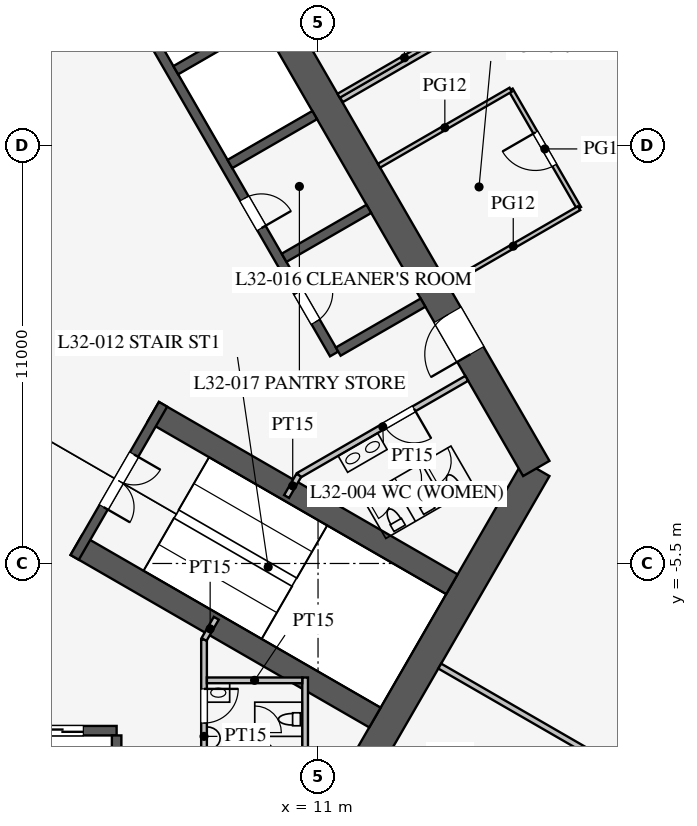
"""IFC4 building model, lengths in metres.
Left out: names, types, materials, properties, quantities, classifications, styles, units other than length and angle.
Written with IfcOpenShell. Run it as: python <this file> out.ifc"""

import sys

from ifc_helpers import new_model, si_unit, direction, frame, frame_2d, origin, place, context, subcontext, project, spatial, rectangle, extrude, element, fill, save


model = new_model("IFC4")
c1 = context("Model", 3, precision=1e-05, world=origin(), true_north=direction((0.0, 1.0)))
c2 = subcontext(c1, "Body", "Model", "MODEL_VIEW")
j1 = project(units=[si_unit("LENGTHUNIT", "METRE"), si_unit("PLANEANGLEUNIT", "RADIAN")], contexts=[c1])
p1 = place(None, origin())
s1 = spatial("IfcSite", under=j1, at=p1, CompositionType="ELEMENT")
p2 = place(p1, origin())
s2 = spatial("IfcBuilding", under=s1, at=p2, CompositionType="ELEMENT")
p3 = place(p2, frame((0.0, 0.0, 140.9)))
s3 = spatial("IfcBuildingStorey", under=s2, at=p3, CompositionType="ELEMENT", Elevation=140.9)
p4 = place(p3, frame((10.97, -13.0, 0.0), z_axis=(0.0, 0.0, 1.0), x_axis=(0.499995765644, 0.866027848477, 0.0)))
e1 = element("IfcWall", 1, at=p4, inside=s3, PredefinedType="SHEAR", context=c2, shape_type="SweptSolid", body=[
    extrude(rectangle(XDim=11.547, YDim=0.8, at=frame_2d((5.773, 0.0))), origin(), (0.0, 0.0, 1.0), 4.2),
])
p5 = place(p3, frame((16.743, -3.0, 0.0), z_axis=(0.0, 0.0, 1.0), x_axis=(-0.500002442456, 0.866023993627, 0.0)))
e2 = element("IfcWall", 2, at=p5, inside=s3, PredefinedType="SHEAR", context=c2, shape_type="SweptSolid", body=[
    extrude(rectangle(XDim=21.939, YDim=0.8, at=frame_2d((10.97, 0.0))), origin(), (0.0, 0.0, 1.0), 4.2),
])
p6 = place(p5, frame((17.27, 0.0, 0.0)))
e3 = element("IfcOpeningElement", 3, at=p6, cuts=e2, PredefinedType="OPENING", context=c2, shape_type="SweptSolid", body=[
    extrude(rectangle(XDim=1.2, YDim=2.1, at=frame_2d((0.6, 1.05))), frame((0.0, 0.41, 0.0), z_axis=(0.0, -1.0, 0.0), x_axis=(1.0, 0.0, 0.0)), (0.0, 0.0, 1.0), 0.82),
])
p7 = place(p5, frame((3.47, 0.0, 0.0)))
e4 = element("IfcOpeningElement", 4, at=p7, cuts=e2, PredefinedType="OPENING", context=c2, shape_type="SweptSolid", body=[
    extrude(rectangle(XDim=1.2, YDim=2.1, at=frame_2d((0.6, 1.05))), frame((0.0, 0.41, 0.0), z_axis=(0.0, -1.0, 0.0), x_axis=(1.0, 0.0, 0.0)), (0.0, 0.0, 1.0), 0.82),
])
p8 = place(p3, frame((-5.7, -9.9, 0.0), z_axis=(0.0, 0.0, 1.0), x_axis=(1.0, 0.0, 0.0)))
e5 = element("IfcWall", 5, at=p8, inside=s3, PredefinedType="SHEAR", context=c2, shape_type="SweptSolid", body=[
    extrude(rectangle(XDim=11.4, YDim=0.25, at=frame_2d((5.7, 0.0))), origin(), (0.0, 0.0, 1.0), 4.2),
])
p9 = place(p8, frame((0.875, 0.0, 0.0)))
e6 = element("IfcOpeningElement", 6, at=p9, cuts=e5, PredefinedType="OPENING", context=c2, shape_type="SweptSolid", body=[
    extrude(rectangle(XDim=1.1, YDim=2.2, at=frame_2d((0.55, 1.1))), frame((0.0, 0.135, 0.0), z_axis=(0.0, -1.0, 0.0), x_axis=(1.0, 0.0, 0.0)), (0.0, 0.0, 1.0), 0.27),
])
p10 = place(p8, frame((3.725, 0.0, 0.0)))
e7 = element("IfcOpeningElement", 7, at=p10, cuts=e5, PredefinedType="OPENING", context=c2, shape_type="SweptSolid", body=[
    extrude(rectangle(XDim=1.1, YDim=2.2, at=frame_2d((0.55, 1.1))), frame((0.0, 0.135, 0.0), z_axis=(0.0, -1.0, 0.0), x_axis=(1.0, 0.0, 0.0)), (0.0, 0.0, 1.0), 0.27),
])
p11 = place(p8, frame((6.575, 0.0, 0.0)))
e8 = element("IfcOpeningElement", 8, at=p11, cuts=e5, PredefinedType="OPENING", context=c2, shape_type="SweptSolid", body=[
    extrude(rectangle(XDim=1.1, YDim=2.2, at=frame_2d((0.55, 1.1))), frame((0.0, 0.135, 0.0), z_axis=(0.0, -1.0, 0.0), x_axis=(1.0, 0.0, 0.0)), (0.0, 0.0, 1.0), 0.27),
])
p12 = place(p8, frame((9.425, 0.0, 0.0)))
e9 = element("IfcOpeningElement", 9, at=p12, cuts=e5, PredefinedType="OPENING", context=c2, shape_type="SweptSolid", body=[
    extrude(rectangle(XDim=1.1, YDim=2.2, at=frame_2d((0.55, 1.1))), frame((0.0, 0.135, 0.0), z_axis=(0.0, -1.0, 0.0), x_axis=(1.0, 0.0, 0.0)), (0.0, 0.0, 1.0), 0.27),
])
p13 = place(p3, frame((5.7, -10.025, 0.0), z_axis=(0.0, 0.0, 1.0), x_axis=(0.0, -1.0, 0.0)))
e10 = element("IfcWall", 10, at=p13, inside=s3, PredefinedType="SHEAR", context=c2, shape_type="SweptSolid", body=[
    extrude(rectangle(XDim=2.575, YDim=0.25, at=frame_2d((1.288, 0.0))), origin(), (0.0, 0.0, 1.0), 4.2),
])
p14 = place(p3, frame((11.424, 0.014, 0.0), z_axis=(0.0, 0.0, 1.0), x_axis=(-0.500001763848, 0.866024385424, 0.0)))
e11 = element("IfcWall", 11, at=p14, inside=s3, PredefinedType="SHEAR", context=c2, shape_type="SweptSolid", body=[
    extrude(rectangle(XDim=11.4, YDim=0.25, at=frame_2d((5.7, 0.0))), origin(), (0.0, 0.0, 1.0), 4.2),
])
p15 = place(p14, frame((0.975, 0.0, 0.0)))
e12 = element("IfcOpeningElement", 12, at=p15, cuts=e11, PredefinedType="OPENING", context=c2, shape_type="SweptSolid", body=[
    extrude(rectangle(XDim=0.9, YDim=2.1, at=frame_2d((0.45, 1.05))), frame((0.0, 0.135, 0.0), z_axis=(0.0, -1.0, 0.0), x_axis=(1.0, 0.0, 0.0)), (0.0, 0.0, 1.0), 0.27),
])
p16 = place(p14, frame((3.825, 0.0, 0.0)))
e13 = element("IfcOpeningElement", 13, at=p16, cuts=e11, PredefinedType="OPENING", context=c2, shape_type="SweptSolid", body=[
    extrude(rectangle(XDim=0.9, YDim=2.1, at=frame_2d((0.45, 1.05))), frame((0.0, 0.135, 0.0), z_axis=(0.0, -1.0, 0.0), x_axis=(1.0, 0.0, 0.0)), (0.0, 0.0, 1.0), 0.27),
])
for number, where, z_axis, x_axis in (
    (14, (11.532, 0.076, 0.0), (0.0, 0.0, 1.0), (0.866, 0.5, 0.0)),
    (15, (10.107, 2.544, 0.0), (0.0, 0.0, 1.0), (0.866, 0.5, 0.0)),
    (16, (8.682, 5.012, 0.0), (0.0, 0.0, 1.0), (0.866, 0.5, 0.0)),
    (17, (7.257, 7.481, 0.0), (0.0, 0.0, 1.0), (0.866, 0.5, 0.0)),
):
    element("IfcWall", number, at=place(p3, frame(where, z_axis=z_axis, x_axis=x_axis)), inside=s3, PredefinedType="SHEAR", context=c2, shape_type="SweptSolid", body=[
        extrude(rectangle(XDim=2.575, YDim=0.25, at=frame_2d((1.288, 0.0))), origin(), (0.0, 0.0, 1.0), 4.2),
    ])
for number, where, z_axis, x_axis in (
    (18, (4.638, -5.016, 0.0), (0.0, 0.0, 1.0), (0.866, -0.5, 0.0)),
    (19, (6.663, -1.509, 0.0), (0.0, 0.0, 1.0), (0.866, -0.5, 0.0)),
):
    element("IfcWall", number, at=place(p3, frame(where, z_axis=z_axis, x_axis=x_axis)), inside=s3, PredefinedType="SHEAR", context=c2, shape_type="SweptSolid", body=[
        extrude(rectangle(XDim=9.075, YDim=0.6, at=frame_2d((4.538, 0.0))), origin(), (0.0, 0.0, 1.0), 4.2),
    ])
p17 = place(p3, frame((4.597, -5.339, 0.0), z_axis=(0.0, 0.0, 1.0), x_axis=(0.499984536904, 0.866034331223, 0.0)))
e20 = element("IfcWall", 20, at=p17, inside=s3, PredefinedType="SHEAR", context=c2, shape_type="SweptSolid", body=[
    extrude(rectangle(XDim=4.65, YDim=0.25, at=frame_2d((2.325, 0.0))), origin(), (0.0, 0.0, 1.0), 4.2),
])
p18 = place(p17, frame((1.525, 0.0, 0.0)))
e21 = element("IfcOpeningElement", 21, at=p18, cuts=e20, PredefinedType="OPENING", context=c2, shape_type="SweptSolid", body=[
    extrude(rectangle(XDim=1.6, YDim=2.1, at=frame_2d((0.8, 1.05))), frame((0.0, 0.135, 0.0), z_axis=(0.0, -1.0, 0.0), x_axis=(1.0, 0.0, 0.0)), (0.0, 0.0, 1.0), 0.27),
])
p19 = place(p3, frame((8.0, -7.5, 0.0), z_axis=(0.0, 0.0, 1.0), x_axis=(0.0, -1.0, 0.0)))
e22 = element("IfcWall", 22, at=p19, inside=s3, PredefinedType="PARTITIONING", context=c2, shape_type="SweptSolid", body=[
    extrude(rectangle(XDim=5.1, YDim=0.15, at=frame_2d((2.55, 0.0))), origin(), (0.0, 0.0, 1.0), 4.0),
])
p20 = place(p19, frame((1.3, 0.0, 0.0)))
e23 = element("IfcOpeningElement", 23, at=p20, cuts=e22, PredefinedType="OPENING", context=c2, shape_type="SweptSolid", body=[
    extrude(rectangle(XDim=0.9, YDim=2.1, at=frame_2d((0.45, 1.05))), frame((0.0, 0.085, 0.0), z_axis=(0.0, -1.0, 0.0), x_axis=(1.0, 0.0, 0.0)), (0.0, 0.0, 1.0), 0.17),
])
p21 = place(p3, frame((10.495, -3.178, 0.0), z_axis=(0.0, 0.0, 1.0), x_axis=(0.86602216432, 0.500005610874, 0.0)))
e24 = element("IfcWall", 24, at=p21, inside=s3, PredefinedType="PARTITIONING", context=c2, shape_type="SweptSolid", body=[
    extrude(rectangle(XDim=5.1, YDim=0.15, at=frame_2d((2.55, 0.0))), origin(), (0.0, 0.0, 1.0), 4.0),
])
p22 = place(p21, frame((2.6, 0.0, 0.0)))
e25 = element("IfcOpeningElement", 25, at=p22, cuts=e24, PredefinedType="OPENING", context=c2, shape_type="SweptSolid", body=[
    extrude(rectangle(XDim=0.9, YDim=2.1, at=frame_2d((0.45, 1.05))), frame((0.0, 0.085, 0.0), z_axis=(0.0, -1.0, 0.0), x_axis=(1.0, 0.0, 0.0)), (0.0, 0.0, 1.0), 0.17),
])
for number, where, z_axis, x_axis in (
    (26, (8.0, -7.5, 0.0), (0.0, 0.0, 1.0), (0.5, 0.866, 0.0)),
    (27, (10.495, -3.178, 0.0), (0.0, 0.0, 1.0), (-0.5, -0.866, 0.0)),
):
    element("IfcWall", number, at=place(p3, frame(where, z_axis=z_axis, x_axis=x_axis)), inside=s3, PredefinedType="PARTITIONING", context=c2, shape_type="SweptSolid", body=[
        extrude(rectangle(XDim=0.645, YDim=0.15, at=frame_2d((0.323, 0.0))), origin(), (0.0, 0.0, 1.0), 4.0),
    ])
p23 = place(p3, frame((10.66, -8.5, 0.0), z_axis=(0.0, 0.0, 1.0), x_axis=(0.0, -1.0, 0.0)))
e28 = element("IfcWall", 28, at=p23, inside=s3, PredefinedType="PARTITIONING", context=c2, shape_type="SweptSolid", body=[
    extrude(rectangle(XDim=4.1, YDim=0.15, at=frame_2d((2.05, 0.0))), origin(), (0.0, 0.0, 1.0), 4.0),
])
p24 = place(p3, frame((8.075, -8.575, 0.0), z_axis=(0.0, 0.0, 1.0), x_axis=(1.0, 0.0, 0.0)))
e29 = element("IfcWall", 29, at=p24, inside=s3, PredefinedType="PARTITIONING", context=c2, shape_type="SweptSolid", body=[
    extrude(rectangle(XDim=2.51, YDim=0.15, at=frame_2d((1.255, 0.0))), origin(), (0.0, 0.0, 1.0), 4.0),
])
p25 = place(p3, frame((14.203, -8.2, 0.0), z_axis=(0.0, 0.0, 1.0), x_axis=(0.866024668836, -0.500001272966, 0.0)))
e30 = element("IfcWall", 30, at=p25, inside=s3, PredefinedType="PARTITIONING", context=c2, shape_type="SweptSolid", body=[
    extrude(rectangle(XDim=16.65, YDim=0.15, at=frame_2d((8.325, 0.0))), origin(), (0.0, 0.0, 1.0), 2.3),
])
p26 = place(p3, frame((11.613, 6.705, 0.0), z_axis=(0.0, 0.0, 1.0), x_axis=(0.866031170684, 0.499990011303, 0.0)))
e31 = element("IfcWall", 31, at=p26, inside=s3, PredefinedType="PARTITIONING", context=c2, shape_type="SweptSolid", body=[
    extrude(rectangle(XDim=11.585, YDim=0.15, at=frame_2d((5.792, 0.0))), origin(), (0.0, 0.0, 1.0), 3.2),
])
p27 = place(p3, frame((17.869, 3.85, 0.0), z_axis=(0.0, 0.0, 1.0), x_axis=(-0.500012057535, 0.866018442252, 0.0)))
e32 = element("IfcWall", 32, at=p27, inside=s3, PredefinedType="PARTITIONING", context=c2, shape_type="SweptSolid", body=[
    extrude(rectangle(XDim=3.6, YDim=0.12, at=frame_2d((1.8, 0.0))), origin(), (0.0, 0.0, 1.0), 2.9),
])
p28 = place(p27, frame((1.3, 0.0, 0.15)))
e33 = element("IfcOpeningElement", 33, at=p28, cuts=e32, PredefinedType="OPENING", context=c2, shape_type="SweptSolid", body=[
    extrude(rectangle(XDim=1.0, YDim=2.1, at=frame_2d((0.5, 1.05))), frame((0.0, 0.07, 0.0), z_axis=(0.0, -1.0, 0.0), x_axis=(1.0, 0.0, 0.0)), (0.0, 0.0, 1.0), 0.14),
])
for number, where, z_axis, x_axis in (
    (34, (11.542, 6.808, 0.0), (0.0, 0.0, 1.0), (0.866, 0.5, 0.0)),
    (35, (12.605, 4.968, 0.0), (0.0, 0.0, 1.0), (0.866, 0.5, 0.0)),
    (36, (14.405, 1.85, 0.0), (0.0, 0.0, 1.0), (0.866, 0.5, 0.0)),
):
    element("IfcWall", number, at=place(p3, frame(where, z_axis=z_axis, x_axis=x_axis)), inside=s3, PredefinedType="PARTITIONING", context=c2, shape_type="SweptSolid", body=[
        extrude(rectangle(XDim=4.0, YDim=0.12, at=frame_2d((2.0, 0.0))), origin(), (0.0, 0.0, 1.0), 2.9),
    ])
p29 = place(p20, origin())
e37 = element("IfcDoor", 37, at=p29, inside=s3, OperationType="SINGLE_SWING_LEFT", PredefinedType="DOOR", context=c2, shape_type="SweptSolid", body=[
    extrude(rectangle(XDim=0.9, YDim=2.1, at=frame_2d((0.45, 1.05))), frame((0.0, 0.025, 0.0), z_axis=(0.0, -1.0, 0.0), x_axis=(1.0, 0.0, 0.0)), (0.0, 0.0, 1.0), 0.05),
])
fill(e23, e37)
p30 = place(p22, frame((0.9, 0.0, 0.0), z_axis=(0.0, 0.0, 1.0), x_axis=(-1.0, 0.0, 0.0)))
e38 = element("IfcDoor", 38, at=p30, inside=s3, OperationType="SINGLE_SWING_LEFT", PredefinedType="DOOR", context=c2, shape_type="SweptSolid", body=[
    extrude(rectangle(XDim=0.9, YDim=2.1, at=frame_2d((0.45, 1.05))), frame((0.0, 0.025, 0.0), z_axis=(0.0, -1.0, 0.0), x_axis=(1.0, 0.0, 0.0)), (0.0, 0.0, 1.0), 0.05),
])
fill(e25, e38)
p31 = place(p18, frame((1.6, 0.0, 0.0), z_axis=(0.0, 0.0, 1.0), x_axis=(-1.0, 0.0, 0.0)))
e39 = element("IfcDoor", 39, at=p31, inside=s3, OperationType="DOUBLE_DOOR_SINGLE_SWING", PredefinedType="DOOR", context=c2, shape_type="SweptSolid", body=[
    extrude(rectangle(XDim=1.6, YDim=2.1, at=frame_2d((0.8, 1.05))), frame((0.0, 0.025, 0.0), z_axis=(0.0, -1.0, 0.0), x_axis=(1.0, 0.0, 0.0)), (0.0, 0.0, 1.0), 0.05),
])
fill(e21, e39)
p32 = place(p7, origin())
e40 = element("IfcDoor", 40, at=p32, inside=s3, OperationType="SINGLE_SWING_LEFT", PredefinedType="DOOR", context=c2, shape_type="SweptSolid", body=[
    extrude(rectangle(XDim=1.2, YDim=2.1, at=frame_2d((0.6, 1.05))), frame((0.0, 0.025, 0.0), z_axis=(0.0, -1.0, 0.0), x_axis=(1.0, 0.0, 0.0)), (0.0, 0.0, 1.0), 0.05),
])
fill(e4, e40)
p33 = place(p15, frame((0.9, 0.0, 0.0), z_axis=(0.0, 0.0, 1.0), x_axis=(-1.0, 0.0, 0.0)))
e41 = element("IfcDoor", 41, at=p33, inside=s3, OperationType="SINGLE_SWING_LEFT", PredefinedType="DOOR", context=c2, shape_type="SweptSolid", body=[
    extrude(rectangle(XDim=0.9, YDim=2.1, at=frame_2d((0.45, 1.05))), frame((0.0, 0.025, 0.0), z_axis=(0.0, -1.0, 0.0), x_axis=(1.0, 0.0, 0.0)), (0.0, 0.0, 1.0), 0.05),
])
fill(e12, e41)
p34 = place(p16, frame((0.9, 0.0, 0.0), z_axis=(0.0, 0.0, 1.0), x_axis=(-1.0, 0.0, 0.0)))
e42 = element("IfcDoor", 42, at=p34, inside=s3, OperationType="SINGLE_SWING_RIGHT", PredefinedType="DOOR", context=c2, shape_type="SweptSolid", body=[
    extrude(rectangle(XDim=0.9, YDim=2.1, at=frame_2d((0.45, 1.05))), frame((0.0, 0.025, 0.0), z_axis=(0.0, -1.0, 0.0), x_axis=(1.0, 0.0, 0.0)), (0.0, 0.0, 1.0), 0.05),
])
fill(e13, e42)
p35 = place(p28, origin())
e43 = element("IfcDoor", 43, at=p35, inside=s3, OperationType="SINGLE_SWING_RIGHT", PredefinedType="DOOR", context=c2, shape_type="SweptSolid", body=[
    extrude(rectangle(XDim=1.0, YDim=2.1, at=frame_2d((0.5, 1.05))), frame((0.0, 0.025, 0.0), z_axis=(0.0, -1.0, 0.0), x_axis=(1.0, 0.0, 0.0)), (0.0, 0.0, 1.0), 0.05),
])
fill(e33, e43)
p36 = place(p12, origin())
e44 = element("IfcDoor", 44, at=p36, inside=s3, OperationType="DOUBLE_DOOR_SLIDING", PredefinedType="DOOR", context=c2, shape_type="SweptSolid", body=[
    extrude(rectangle(XDim=1.1, YDim=2.2, at=frame_2d((0.55, 1.1))), frame((0.0, 0.025, 0.0), z_axis=(0.0, -1.0, 0.0), x_axis=(1.0, 0.0, 0.0)), (0.0, 0.0, 1.0), 0.05),
])
fill(e9, e44)
save(model, sys.argv[1])
